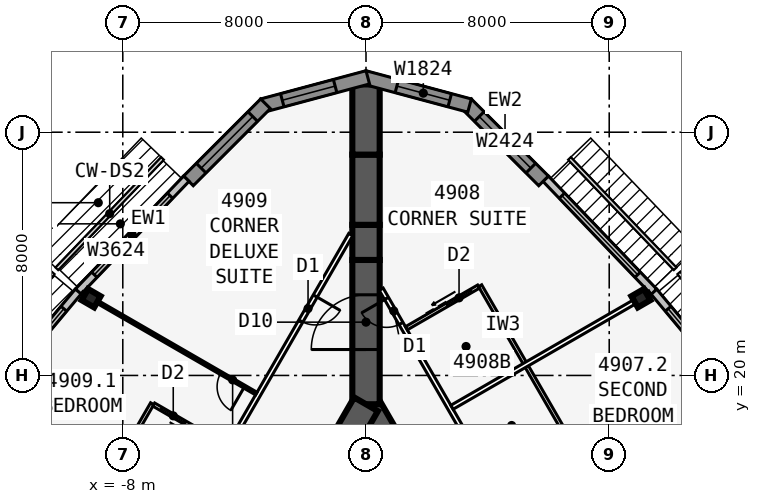
"""IFC4 building model, lengths in metres.
Left out: names, types, materials, properties, quantities, classifications, styles, units other than length and angle.
Written with IfcOpenShell. Run it as: python <this file> out.ifc"""

import sys

from ifc_helpers import new_model, si_unit, direction, frame, frame_2d, origin, origin_2d, place, context, subcontext, project, spatial, polyline, rectangle, i_section, outline, extrude, element, fill, save


model = new_model("IFC4")
c1 = context("Model", 3, precision=1e-05, world=origin(), true_north=direction((0.0, 1.0)))
c2 = subcontext(c1, "Body", "Model", "MODEL_VIEW")
j1 = project(units=[si_unit("LENGTHUNIT", "METRE"), si_unit("PLANEANGLEUNIT", "RADIAN")], contexts=[c1])
p1 = place(None, origin())
s1 = spatial("IfcSite", under=j1, at=p1, CompositionType="ELEMENT")
p2 = place(p1, origin())
s2 = spatial("IfcBuilding", under=s1, at=p2, CompositionType="ELEMENT")
p3 = place(p2, frame((0.0, 0.0, 182.7)))
s3 = spatial("IfcBuildingStorey", under=s2, at=p3, CompositionType="ELEMENT", Elevation=182.7)
p4 = place(p3, frame((16.5, -9.526, 0.0), z_axis=(0.0, 0.0, 1.0), x_axis=(-0.499999749417, 0.866025548458, 0.0)))
e1 = element("IfcWall", 1, at=p4, inside=s3, PredefinedType="SHEAR", context=c2, shape_type="SweptSolid", body=[
    extrude(rectangle(XDim=33.0, YDim=0.9, at=frame_2d((16.5, 0.0))), origin(), (0.0, 0.0, 1.0), 3.4),
])
p5 = place(p4, frame((14.15, 0.0, 0.0)))
e2 = element("IfcOpeningElement", 2, at=p5, cuts=e1, PredefinedType="OPENING", context=c2, shape_type="SweptSolid", body=[
    extrude(rectangle(XDim=1.8, YDim=2.13, at=frame_2d((0.9, 1.065))), frame((0.0, 0.46, 0.0), z_axis=(0.0, -1.0, 0.0), x_axis=(1.0, 0.0, 0.0)), (0.0, 0.0, 1.0), 0.92),
])
p6 = place(p4, frame((12.6, 0.0, 0.0)))
e3 = element("IfcOpeningElement", 3, at=p6, cuts=e1, PredefinedType="OPENING", context=c2, shape_type="SweptSolid", body=[
    extrude(rectangle(XDim=1.0, YDim=2.13, at=frame_2d((0.5, 1.065))), frame((0.0, 0.46, 0.0), z_axis=(0.0, -1.0, 0.0), x_axis=(1.0, 0.0, 0.0)), (0.0, 0.0, 1.0), 0.92),
])
p7 = place(p3, frame((0.0, 19.052, 0.0), z_axis=(0.0, 0.0, 1.0), x_axis=(-0.499999749417, -0.866025548458, 0.0)))
e4 = element("IfcWall", 4, at=p7, inside=s3, PredefinedType="SHEAR", context=c2, shape_type="SweptSolid", body=[
    extrude(rectangle(XDim=33.0, YDim=0.9, at=frame_2d((16.5, 0.0))), origin(), (0.0, 0.0, 1.0), 3.4),
])
p8 = place(p7, frame((14.15, 0.0, 0.0)))
e5 = element("IfcOpeningElement", 5, at=p8, cuts=e4, PredefinedType="OPENING", context=c2, shape_type="SweptSolid", body=[
    extrude(rectangle(XDim=1.8, YDim=2.13, at=frame_2d((0.9, 1.065))), frame((0.0, 0.46, 0.0), z_axis=(0.0, -1.0, 0.0), x_axis=(1.0, 0.0, 0.0)), (0.0, 0.0, 1.0), 0.92),
])
p9 = place(p7, frame((12.6, 0.0, 0.0)))
e6 = element("IfcOpeningElement", 6, at=p9, cuts=e4, PredefinedType="OPENING", context=c2, shape_type="SweptSolid", body=[
    extrude(rectangle(XDim=1.0, YDim=2.13, at=frame_2d((0.5, 1.065))), frame((0.0, 0.46, 0.0), z_axis=(0.0, -1.0, 0.0), x_axis=(1.0, 0.0, 0.0)), (0.0, 0.0, 1.0), 0.92),
])
p10 = place(p3, frame((0.0, 19.052, 0.0), z_axis=(0.0, 0.0, 1.0), x_axis=(0.0, 1.0, 0.0)))
e7 = element("IfcWall", 7, at=p10, inside=s3, PredefinedType="SHEAR", context=c2, shape_type="SweptSolid", body=[
    extrude(rectangle(XDim=4.746, YDim=0.9, at=frame_2d((2.373, 0.0))), origin(), (0.0, 0.0, 1.0), 3.4),
])
p11 = place(p10, frame((1.8, 0.0, 0.0)))
e8 = element("IfcOpeningElement", 8, at=p11, cuts=e7, PredefinedType="OPENING", context=c2, shape_type="SweptSolid", body=[
    extrude(rectangle(XDim=1.8, YDim=2.13, at=frame_2d((0.9, 1.065))), frame((0.0, 0.46, 0.0), z_axis=(0.0, -1.0, 0.0), x_axis=(1.0, 0.0, 0.0)), (0.0, 0.0, 1.0), 0.92),
])
p12 = place(p3, frame((0.0, 23.799, 0.0), z_axis=(0.0, 0.0, 1.0), x_axis=(0.0, 1.0, 0.0)))
e9 = element("IfcWall", 9, at=p12, inside=s3, PredefinedType="SHEAR", context=c2, shape_type="SweptSolid", body=[
    extrude(rectangle(XDim=1.155, YDim=0.9, at=frame_2d((0.577, 0.0))), origin(), (0.0, 0.0, 1.0), 3.4),
])
p13 = place(p3, frame((0.0, 24.953, 0.0), z_axis=(0.0, 0.0, 1.0), x_axis=(0.0, 1.0, 0.0)))
e10 = element("IfcWall", 10, at=p13, inside=s3, PredefinedType="SHEAR", context=c2, shape_type="SweptSolid", body=[
    extrude(rectangle(XDim=2.309, YDim=0.9, at=frame_2d((1.155, 0.0))), origin(), (0.0, 0.0, 1.0), 3.4),
])
p14 = place(p3, frame((0.0, 27.263, 0.0), z_axis=(0.0, 0.0, 1.0), x_axis=(0.0, 1.0, 0.0)))
e11 = element("IfcWall", 11, at=p14, inside=s3, PredefinedType="SHEAR", context=c2, shape_type="SweptSolid", body=[
    extrude(rectangle(XDim=2.31, YDim=0.9, at=frame_2d((1.155, 0.0))), origin(), (0.0, 0.0, 1.0), 3.4),
])
for number, where, z_axis, x_axis in (
    (12, (9.041, 22.541, 0.0), (0.0, 0.0, 1.0), (-0.5, 0.866, 0.0)),
    (13, (-9.041, 22.541, 0.0), (0.0, 0.0, 1.0), (-0.5, -0.866, 0.0)),
):
    element("IfcColumn", number, at=place(p3, frame(where, z_axis=z_axis, x_axis=x_axis)), inside=s3, PredefinedType="COLUMN", context=c2, shape_type="SweptSolid", body=[
        extrude(i_section(OverallWidth=0.424, OverallDepth=0.475, WebThickness=0.048, FlangeThickness=0.077, at=origin_2d()), origin(), (0.0, 0.0, 1.0), 3.4),
    ])
p15 = place(p3, frame((12.723, 18.868, 0.0), z_axis=(0.0, 0.0, 1.0), x_axis=(-0.641810386606, 0.766863369607, 0.0)))
e14 = element("IfcWall", 14, at=p15, inside=s3, PredefinedType="STANDARD", context=c2, shape_type="SweptSolid", body=[
    extrude(rectangle(XDim=5.076, YDim=0.25, at=frame_2d((2.538, 0.0))), origin(), (0.0, 0.0, 1.0), 3.235),
])
p16 = place(p15, frame((0.738, 0.0, 0.45)))
e15 = element("IfcOpeningElement", 15, at=p16, cuts=e14, PredefinedType="OPENING", context=c2, shape_type="SweptSolid", body=[
    extrude(rectangle(XDim=3.6, YDim=2.4, at=frame_2d((1.8, 1.2))), frame((0.0, 0.135, 0.0), z_axis=(0.0, -1.0, 0.0), x_axis=(1.0, 0.0, 0.0)), (0.0, 0.0, 1.0), 0.27),
])
p17 = place(p3, frame((9.471, 22.754, 0.0), z_axis=(0.0, 0.0, 1.0), x_axis=(-0.691719937936, 0.722165858693, 0.0)))
e16 = element("IfcWall", 16, at=p17, inside=s3, PredefinedType="STANDARD", context=c2, shape_type="SweptSolid", body=[
    extrude(rectangle(XDim=5.148, YDim=0.25, at=frame_2d((2.574, 0.0))), origin(), (0.0, 0.0, 1.0), 3.235),
])
p18 = place(p17, frame((0.774, 0.0, 0.45)))
e17 = element("IfcOpeningElement", 17, at=p18, cuts=e16, PredefinedType="OPENING", context=c2, shape_type="SweptSolid", body=[
    extrude(rectangle(XDim=3.6, YDim=2.4, at=frame_2d((1.8, 1.2))), frame((0.0, 0.135, 0.0), z_axis=(0.0, -1.0, 0.0), x_axis=(1.0, 0.0, 0.0)), (0.0, 0.0, 1.0), 0.27),
])
p19 = place(p3, frame((5.841, 26.399, 0.0), z_axis=(0.0, 0.0, 1.0), x_axis=(-0.707106781187, 0.707106781187, 0.0)))
e18 = element("IfcWall", 18, at=p19, inside=s3, PredefinedType="SOLIDWALL", context=c2, shape_type="SweptSolid", body=[
    extrude(rectangle(XDim=3.586, YDim=0.45, at=frame_2d((1.793, 0.0))), origin(), (0.0, 0.0, 1.0), 3.235),
])
p20 = place(p19, frame((0.593, 0.0, 0.45)))
e19 = element("IfcOpeningElement", 19, at=p20, cuts=e18, PredefinedType="OPENING", context=c2, shape_type="SweptSolid", body=[
    extrude(rectangle(XDim=2.4, YDim=2.4, at=frame_2d((1.2, 1.2))), frame((0.0, 0.235, 0.0), z_axis=(0.0, -1.0, 0.0), x_axis=(1.0, 0.0, 0.0)), (0.0, 0.0, 1.0), 0.47),
])
p21 = place(p3, frame((3.406, 28.877, 0.0), z_axis=(0.0, 0.0, 1.0), x_axis=(-0.965924653531, 0.258823421857, 0.0)))
e20 = element("IfcWall", 20, at=p21, inside=s3, PredefinedType="SOLIDWALL", context=c2, shape_type="SweptSolid", body=[
    extrude(outline(polyline([(3.586, 0.225), (3.527, 0.225), (3.035, 0.093), (3.0, 0.225), (0.0, 0.225), (0.0, -0.225), (3.586, -0.225), (3.586, 0.225)])), origin(), (0.0, 0.0, 1.0), 3.235),
])
p22 = place(p21, frame((0.675, 0.0, 0.45)))
e21 = element("IfcOpeningElement", 21, at=p22, cuts=e20, PredefinedType="OPENING", context=c2, shape_type="SweptSolid", body=[
    extrude(rectangle(XDim=1.8, YDim=2.4, at=frame_2d((0.9, 1.2))), frame((0.0, 0.235, 0.0), z_axis=(0.0, -1.0, 0.0), x_axis=(1.0, 0.0, 0.0)), (0.0, 0.0, 1.0), 0.47),
])
p23 = place(p3, frame((0.058, 29.805, 0.0), z_axis=(0.0, 0.0, 1.0), x_axis=(-0.965924653531, -0.258823421857, 0.0)))
e22 = element("IfcWall", 22, at=p23, inside=s3, PredefinedType="SOLIDWALL", context=c2, shape_type="SweptSolid", body=[
    extrude(outline(polyline([(3.586, 0.225), (0.586, 0.225), (0.551, 0.093), (0.06, 0.225), (0.0, 0.225), (0.0, -0.225), (3.586, -0.225), (3.586, 0.225)])), origin(), (0.0, 0.0, 1.0), 3.235),
])
p24 = place(p23, frame((1.111, 0.0, 0.45)))
e23 = element("IfcOpeningElement", 23, at=p24, cuts=e22, PredefinedType="OPENING", context=c2, shape_type="SweptSolid", body=[
    extrude(rectangle(XDim=1.8, YDim=2.4, at=frame_2d((0.9, 1.2))), frame((0.0, 0.235, 0.0), z_axis=(0.0, -1.0, 0.0), x_axis=(1.0, 0.0, 0.0)), (0.0, 0.0, 1.0), 0.47),
])
p25 = place(p3, frame((-3.305, 28.935, 0.0), z_axis=(0.0, 0.0, 1.0), x_axis=(-0.707106781187, -0.707106781187, 0.0)))
e24 = element("IfcWall", 24, at=p25, inside=s3, PredefinedType="SOLIDWALL", context=c2, shape_type="SweptSolid", body=[
    extrude(rectangle(XDim=3.586, YDim=0.45, at=frame_2d((1.793, 0.0))), origin(), (0.0, 0.0, 1.0), 3.235),
])
p26 = place(p25, frame((0.593, 0.0, 0.45)))
e25 = element("IfcOpeningElement", 25, at=p26, cuts=e24, PredefinedType="OPENING", context=c2, shape_type="SweptSolid", body=[
    extrude(rectangle(XDim=2.4, YDim=2.4, at=frame_2d((1.2, 1.2))), frame((0.0, 0.235, 0.0), z_axis=(0.0, -1.0, 0.0), x_axis=(1.0, 0.0, 0.0)), (0.0, 0.0, 1.0), 0.47),
])
p27 = place(p3, frame((-5.91, 26.472, 0.0), z_axis=(0.0, 0.0, 1.0), x_axis=(-0.691719937936, -0.722165858693, 0.0)))
e26 = element("IfcWall", 26, at=p27, inside=s3, PredefinedType="STANDARD", context=c2, shape_type="SweptSolid", body=[
    extrude(rectangle(XDim=5.148, YDim=0.25, at=frame_2d((2.574, 0.0))), origin(), (0.0, 0.0, 1.0), 3.235),
])
p28 = place(p27, frame((0.774, 0.0, 0.45)))
e27 = element("IfcOpeningElement", 27, at=p28, cuts=e26, PredefinedType="OPENING", context=c2, shape_type="SweptSolid", body=[
    extrude(rectangle(XDim=3.6, YDim=2.4, at=frame_2d((1.8, 1.2))), frame((0.0, 0.135, 0.0), z_axis=(0.0, -1.0, 0.0), x_axis=(1.0, 0.0, 0.0)), (0.0, 0.0, 1.0), 0.27),
])
p29 = place(p3, frame((-9.465, 22.76, 0.0), z_axis=(0.0, 0.0, 1.0), x_axis=(-0.641810386606, -0.766863369607, 0.0)))
e28 = element("IfcWall", 28, at=p29, inside=s3, PredefinedType="STANDARD", context=c2, shape_type="SweptSolid", body=[
    extrude(rectangle(XDim=5.076, YDim=0.25, at=frame_2d((2.538, 0.0))), origin(), (0.0, 0.0, 1.0), 3.235),
])
p30 = place(p29, frame((0.738, 0.0, 0.45)))
e29 = element("IfcOpeningElement", 29, at=p30, cuts=e28, PredefinedType="OPENING", context=c2, shape_type="SweptSolid", body=[
    extrude(rectangle(XDim=3.6, YDim=2.4, at=frame_2d((1.8, 1.2))), frame((0.0, 0.135, 0.0), z_axis=(0.0, -1.0, 0.0), x_axis=(1.0, 0.0, 0.0)), (0.0, 0.0, 1.0), 0.27),
])
p31 = place(p3, frame((20.027, -10.985, 0.0), z_axis=(0.0, 0.0, 1.0), x_axis=(-0.500001677587, 0.866024435227, 0.0)))
e30 = element("IfcWall", 30, at=p31, inside=s3, PredefinedType="PARTITIONING", context=c2, shape_type="SweptSolid", body=[
    extrude(rectangle(XDim=39.054, YDim=0.15, at=frame_2d((19.527, 0.0))), origin(), (0.0, 0.0, 1.0), 3.235),
])
p32 = place(p31, frame((1.558, 0.0, 0.0)))
e31 = element("IfcOpeningElement", 31, at=p32, cuts=e30, PredefinedType="OPENING", context=c2, shape_type="SweptSolid", body=[
    extrude(rectangle(XDim=0.95, YDim=2.13, at=frame_2d((0.475, 1.065))), frame((0.0, 0.085, 0.0), z_axis=(0.0, -1.0, 0.0), x_axis=(1.0, 0.0, 0.0)), (0.0, 0.0, 1.0), 0.17),
])
p33 = place(p31, frame((12.752, 0.0, 0.0)))
e32 = element("IfcOpeningElement", 32, at=p33, cuts=e30, PredefinedType="OPENING", context=c2, shape_type="SweptSolid", body=[
    extrude(rectangle(XDim=0.95, YDim=2.13, at=frame_2d((0.475, 1.065))), frame((0.0, 0.085, 0.0), z_axis=(0.0, -1.0, 0.0), x_axis=(1.0, 0.0, 0.0)), (0.0, 0.0, 1.0), 0.17),
])
p34 = place(p31, frame((26.552, 0.0, 0.0)))
e33 = element("IfcOpeningElement", 33, at=p34, cuts=e30, PredefinedType="OPENING", context=c2, shape_type="SweptSolid", body=[
    extrude(rectangle(XDim=0.95, YDim=2.13, at=frame_2d((0.475, 1.065))), frame((0.0, 0.085, 0.0), z_axis=(0.0, -1.0, 0.0), x_axis=(1.0, 0.0, 0.0)), (0.0, 0.0, 1.0), 0.17),
])
p35 = place(p31, frame((37.752, 0.0, 0.0)))
e34 = element("IfcOpeningElement", 34, at=p35, cuts=e30, PredefinedType="OPENING", context=c2, shape_type="SweptSolid", body=[
    extrude(rectangle(XDim=0.95, YDim=2.13, at=frame_2d((0.475, 1.065))), frame((0.0, 0.085, 0.0), z_axis=(0.0, -1.0, 0.0), x_axis=(1.0, 0.0, 0.0)), (0.0, 0.0, 1.0), 0.17),
])
p36 = place(p3, frame((5.329, 14.623, 0.0), z_axis=(0.0, 0.0, 1.0), x_axis=(0.866011723728, 0.500023693804, 0.0)))
e35 = element("IfcWall", 35, at=p36, inside=s3, PredefinedType="PARTITIONING", context=c2, shape_type="SweptSolid", body=[
    extrude(rectangle(XDim=8.395, YDim=0.1, at=frame_2d((4.198, 0.0))), origin(), (0.0, 0.0, 1.0), 2.389),
])
p37 = place(p36, frame((0.45, 0.0, 0.0)))
e36 = element("IfcOpeningElement", 36, at=p37, cuts=e35, PredefinedType="OPENING", context=c2, shape_type="SweptSolid", body=[
    extrude(rectangle(XDim=0.9, YDim=2.13, at=frame_2d((0.45, 1.065))), frame((0.0, 0.06, 0.0), z_axis=(0.0, -1.0, 0.0), x_axis=(1.0, 0.0, 0.0)), (0.0, 0.0, 1.0), 0.12),
])
p38 = place(p3, frame((2.829, 18.954, 0.0), z_axis=(0.0, 0.0, 1.0), x_axis=(0.866015739374, 0.500016738876, 0.0)))
e37 = element("IfcWall", 37, at=p38, inside=s3, PredefinedType="PARTITIONING", context=c2, shape_type="SweptSolid", body=[
    extrude(rectangle(XDim=7.516, YDim=0.15, at=frame_2d((3.758, 0.0))), origin(), (0.0, 0.0, 1.0), 2.389),
])
for number, where, z_axis, x_axis in (
    (38, (6.753, 17.755, 0.0), (0.0, 0.0, 1.0), (-0.5, 0.866, 0.0)),
    (39, (5.253, 20.354, 0.0), (0.0, 0.0, 1.0), (-0.5, 0.866, 0.0)),
):
    element("IfcWall", number, at=place(p3, frame(where, z_axis=z_axis, x_axis=x_axis)), inside=s3, PredefinedType="PLUMBINGWALL", context=c2, shape_type="SweptSolid", body=[
        extrude(rectangle(XDim=3.0, YDim=0.12, at=frame_2d((1.5, 0.0))), origin(), (0.0, 0.0, 1.0), 3.235),
    ])
p39 = place(p3, frame((1.329, 21.552, 0.0), z_axis=(0.0, 0.0, 1.0), x_axis=(0.865997131366, 0.500048966069, 0.0)))
e40 = element("IfcWall", 40, at=p39, inside=s3, PredefinedType="PLUMBINGWALL", context=c2, shape_type="SweptSolid", body=[
    extrude(rectangle(XDim=2.74, YDim=0.12, at=frame_2d((1.37, 0.0))), origin(), (0.0, 0.0, 1.0), 3.235),
])
p40 = place(p39, frame((1.55, 0.0, 0.0)))
e41 = element("IfcOpeningElement", 41, at=p40, cuts=e40, PredefinedType="OPENING", context=c2, shape_type="SweptSolid", body=[
    extrude(rectangle(XDim=0.9, YDim=2.13, at=frame_2d((0.45, 1.065))), frame((0.0, 0.07, 0.0), z_axis=(0.0, -1.0, 0.0), x_axis=(1.0, 0.0, 0.0)), (0.0, 0.0, 1.0), 0.14),
])
p41 = place(p3, frame((-0.5, 24.636, 0.0), z_axis=(0.0, 0.0, 1.0), x_axis=(-0.500001915564, -0.86602429783, 0.0)))
e42 = element("IfcWall", 42, at=p41, inside=s3, PredefinedType="PARTITIONING", context=c2, shape_type="SweptSolid", body=[
    extrude(rectangle(XDim=42.172, YDim=0.15, at=frame_2d((21.086, 0.0))), origin(), (0.0, 0.0, 1.0), 3.235),
])
p42 = place(p41, frame((2.338, 0.0, 0.0)))
e43 = element("IfcOpeningElement", 43, at=p42, cuts=e42, PredefinedType="OPENING", context=c2, shape_type="SweptSolid", body=[
    extrude(rectangle(XDim=0.95, YDim=2.13, at=frame_2d((0.475, 1.065))), frame((0.0, 0.085, 0.0), z_axis=(0.0, -1.0, 0.0), x_axis=(1.0, 0.0, 0.0)), (0.0, 0.0, 1.0), 0.17),
])
p43 = place(p41, frame((18.111, 0.0, 0.0)))
e44 = element("IfcOpeningElement", 44, at=p43, cuts=e42, PredefinedType="OPENING", context=c2, shape_type="SweptSolid", body=[
    extrude(rectangle(XDim=0.95, YDim=2.13, at=frame_2d((0.475, 1.065))), frame((0.0, 0.085, 0.0), z_axis=(0.0, -1.0, 0.0), x_axis=(1.0, 0.0, 0.0)), (0.0, 0.0, 1.0), 0.17),
])
p44 = place(p41, frame((28.111, 0.0, 0.0)))
e45 = element("IfcOpeningElement", 45, at=p44, cuts=e42, PredefinedType="OPENING", context=c2, shape_type="SweptSolid", body=[
    extrude(rectangle(XDim=0.95, YDim=2.13, at=frame_2d((0.475, 1.065))), frame((0.0, 0.085, 0.0), z_axis=(0.0, -1.0, 0.0), x_axis=(1.0, 0.0, 0.0)), (0.0, 0.0, 1.0), 0.17),
])
p45 = place(p41, frame((39.311, 0.0, 0.0)))
e46 = element("IfcOpeningElement", 46, at=p45, cuts=e42, PredefinedType="OPENING", context=c2, shape_type="SweptSolid", body=[
    extrude(rectangle(XDim=0.95, YDim=2.13, at=frame_2d((0.475, 1.065))), frame((0.0, 0.085, 0.0), z_axis=(0.0, -1.0, 0.0), x_axis=(1.0, 0.0, 0.0)), (0.0, 0.0, 1.0), 0.17),
])
p46 = place(p3, frame((-3.608, 19.404, 0.0), z_axis=(0.0, 0.0, 1.0), x_axis=(-0.866015989873, 0.500016305018, 0.0)))
e47 = element("IfcWall", 47, at=p46, inside=s3, PredefinedType="PARTITIONING", context=c2, shape_type="SweptSolid", body=[
    extrude(rectangle(XDim=6.616, YDim=0.1, at=frame_2d((3.308, 0.0))), origin(), (0.0, 0.0, 1.0), 2.389),
])
p47 = place(p46, frame((0.45, 0.0, 0.0)))
e48 = element("IfcOpeningElement", 48, at=p47, cuts=e47, PredefinedType="OPENING", context=c2, shape_type="SweptSolid", body=[
    extrude(rectangle(XDim=0.9, YDim=2.13, at=frame_2d((0.45, 1.065))), frame((0.0, 0.06, 0.0), z_axis=(0.0, -1.0, 0.0), x_axis=(1.0, 0.0, 0.0)), (0.0, 0.0, 1.0), 0.12),
])
p48 = place(p3, frame((-6.108, 15.073, 0.0), z_axis=(0.0, 0.0, 1.0), x_axis=(-0.866025567496, 0.499999716443, 0.0)))
e49 = element("IfcWall", 49, at=p48, inside=s3, PredefinedType="PARTITIONING", context=c2, shape_type="SweptSolid", body=[
    extrude(rectangle(XDim=7.495, YDim=0.15, at=frame_2d((3.748, 0.0))), origin(), (0.0, 0.0, 1.0), 2.389),
])
p49 = place(p3, frame((-7.033, 19.072, 0.0), z_axis=(0.0, 0.0, 1.0), x_axis=(-0.499990139034, -0.866031096941, 0.0)))
e50 = element("IfcWall", 50, at=p49, inside=s3, PredefinedType="PLUMBINGWALL", context=c2, shape_type="SweptSolid", body=[
    extrude(rectangle(XDim=3.0, YDim=0.12, at=frame_2d((1.5, 0.0))), origin(), (0.0, 0.0, 1.0), 3.235),
])
p50 = place(p3, frame((-4.608, 17.671, 0.0), z_axis=(0.0, 0.0, 1.0), x_axis=(-0.865997131366, 0.500048966069, 0.0)))
e51 = element("IfcWall", 51, at=p50, inside=s3, PredefinedType="PLUMBINGWALL", context=c2, shape_type="SweptSolid", body=[
    extrude(rectangle(XDim=2.74, YDim=0.12, at=frame_2d((1.37, 0.0))), origin(), (0.0, 0.0, 1.0), 3.235),
])
p51 = place(p50, frame((1.55, 0.0, 0.0)))
e52 = element("IfcOpeningElement", 52, at=p51, cuts=e51, PredefinedType="OPENING", context=c2, shape_type="SweptSolid", body=[
    extrude(rectangle(XDim=0.9, YDim=2.13, at=frame_2d((0.45, 1.065))), frame((0.0, 0.07, 0.0), z_axis=(0.0, -1.0, 0.0), x_axis=(1.0, 0.0, 0.0)), (0.0, 0.0, 1.0), 0.14),
])
p52 = place(p16, origin())
e53 = element("IfcWindow", 53, at=p52, inside=s3, PartitioningType="SINGLE_PANEL", PredefinedType="WINDOW", context=c2, shape_type="SweptSolid", body=[
    extrude(rectangle(XDim=3.6, YDim=2.4, at=frame_2d((1.8, 1.2))), frame((0.0, 0.03, 0.0), z_axis=(0.0, -1.0, 0.0), x_axis=(1.0, 0.0, 0.0)), (0.0, 0.0, 1.0), 0.06),
])
fill(e15, e53)
p53 = place(p18, origin())
e54 = element("IfcWindow", 54, at=p53, inside=s3, PartitioningType="SINGLE_PANEL", PredefinedType="WINDOW", context=c2, shape_type="SweptSolid", body=[
    extrude(rectangle(XDim=3.6, YDim=2.4, at=frame_2d((1.8, 1.2))), frame((0.0, 0.03, 0.0), z_axis=(0.0, -1.0, 0.0), x_axis=(1.0, 0.0, 0.0)), (0.0, 0.0, 1.0), 0.06),
])
fill(e17, e54)
p54 = place(p20, origin())
e55 = element("IfcWindow", 55, at=p54, inside=s3, PartitioningType="SINGLE_PANEL", PredefinedType="WINDOW", context=c2, shape_type="SweptSolid", body=[
    extrude(rectangle(XDim=2.4, YDim=2.4, at=frame_2d((1.2, 1.2))), frame((0.0, 0.03, 0.0), z_axis=(0.0, -1.0, 0.0), x_axis=(1.0, 0.0, 0.0)), (0.0, 0.0, 1.0), 0.06),
])
fill(e19, e55)
p55 = place(p22, origin())
e56 = element("IfcWindow", 56, at=p55, inside=s3, PartitioningType="SINGLE_PANEL", PredefinedType="WINDOW", context=c2, shape_type="SweptSolid", body=[
    extrude(rectangle(XDim=1.8, YDim=2.4, at=frame_2d((0.9, 1.2))), frame((0.0, 0.03, 0.0), z_axis=(0.0, -1.0, 0.0), x_axis=(1.0, 0.0, 0.0)), (0.0, 0.0, 1.0), 0.06),
])
fill(e21, e56)
p56 = place(p24, origin())
e57 = element("IfcWindow", 57, at=p56, inside=s3, PartitioningType="SINGLE_PANEL", PredefinedType="WINDOW", context=c2, shape_type="SweptSolid", body=[
    extrude(rectangle(XDim=1.8, YDim=2.4, at=frame_2d((0.9, 1.2))), frame((0.0, 0.03, 0.0), z_axis=(0.0, -1.0, 0.0), x_axis=(1.0, 0.0, 0.0)), (0.0, 0.0, 1.0), 0.06),
])
fill(e23, e57)
p57 = place(p26, origin())
e58 = element("IfcWindow", 58, at=p57, inside=s3, PartitioningType="SINGLE_PANEL", PredefinedType="WINDOW", context=c2, shape_type="SweptSolid", body=[
    extrude(rectangle(XDim=2.4, YDim=2.4, at=frame_2d((1.2, 1.2))), frame((0.0, 0.03, 0.0), z_axis=(0.0, -1.0, 0.0), x_axis=(1.0, 0.0, 0.0)), (0.0, 0.0, 1.0), 0.06),
])
fill(e25, e58)
p58 = place(p28, origin())
e59 = element("IfcWindow", 59, at=p58, inside=s3, PartitioningType="SINGLE_PANEL", PredefinedType="WINDOW", context=c2, shape_type="SweptSolid", body=[
    extrude(rectangle(XDim=3.6, YDim=2.4, at=frame_2d((1.8, 1.2))), frame((0.0, 0.03, 0.0), z_axis=(0.0, -1.0, 0.0), x_axis=(1.0, 0.0, 0.0)), (0.0, 0.0, 1.0), 0.06),
])
fill(e27, e59)
p59 = place(p30, origin())
e60 = element("IfcWindow", 60, at=p59, inside=s3, PartitioningType="SINGLE_PANEL", PredefinedType="WINDOW", context=c2, shape_type="SweptSolid", body=[
    extrude(rectangle(XDim=3.6, YDim=2.4, at=frame_2d((1.8, 1.2))), frame((0.0, 0.03, 0.0), z_axis=(0.0, -1.0, 0.0), x_axis=(1.0, 0.0, 0.0)), (0.0, 0.0, 1.0), 0.06),
])
fill(e29, e60)
p60 = place(p40, origin())
e61 = element("IfcDoor", 61, at=p60, inside=s3, OperationType="SLIDING_TO_LEFT", PredefinedType="DOOR", context=c2, shape_type="SweptSolid", body=[
    extrude(rectangle(XDim=0.9, YDim=2.13, at=frame_2d((0.45, 1.065))), frame((0.0, 0.025, 0.0), z_axis=(0.0, -1.0, 0.0), x_axis=(1.0, 0.0, 0.0)), (0.0, 0.0, 1.0), 0.05),
])
fill(e41, e61)
p61 = place(p35, origin())
e62 = element("IfcDoor", 62, at=p61, inside=s3, OperationType="SINGLE_SWING_RIGHT", PredefinedType="DOOR", context=c2, shape_type="SweptSolid", body=[
    extrude(rectangle(XDim=0.95, YDim=2.13, at=frame_2d((0.475, 1.065))), frame((0.0, 0.025, 0.0), z_axis=(0.0, -1.0, 0.0), x_axis=(1.0, 0.0, 0.0)), (0.0, 0.0, 1.0), 0.05),
])
fill(e34, e62)
p62 = place(p47, origin())
e63 = element("IfcDoor", 63, at=p62, inside=s3, OperationType="SINGLE_SWING_LEFT", PredefinedType="DOOR", context=c2, shape_type="SweptSolid", body=[
    extrude(rectangle(XDim=0.9, YDim=2.13, at=frame_2d((0.45, 1.065))), frame((0.0, 0.025, 0.0), z_axis=(0.0, -1.0, 0.0), x_axis=(1.0, 0.0, 0.0)), (0.0, 0.0, 1.0), 0.05),
])
fill(e48, e63)
p63 = place(p42, origin())
e64 = element("IfcDoor", 64, at=p63, inside=s3, OperationType="SINGLE_SWING_LEFT", PredefinedType="DOOR", context=c2, shape_type="SweptSolid", body=[
    extrude(rectangle(XDim=0.95, YDim=2.13, at=frame_2d((0.475, 1.065))), frame((0.0, 0.025, 0.0), z_axis=(0.0, -1.0, 0.0), x_axis=(1.0, 0.0, 0.0)), (0.0, 0.0, 1.0), 0.05),
])
fill(e43, e64)
p64 = place(p51, origin())
e65 = element("IfcDoor", 65, at=p64, inside=s3, OperationType="SLIDING_TO_LEFT", PredefinedType="DOOR", context=c2, shape_type="SweptSolid", body=[
    extrude(rectangle(XDim=0.9, YDim=2.13, at=frame_2d((0.45, 1.065))), frame((0.0, 0.025, 0.0), z_axis=(0.0, -1.0, 0.0), x_axis=(1.0, 0.0, 0.0)), (0.0, 0.0, 1.0), 0.05),
])
fill(e52, e65)
p65 = place(p11, origin())
e66 = element("IfcDoor", 66, at=p65, inside=s3, OperationType="DOUBLE_DOOR_DOUBLE_SWING", PredefinedType="DOOR", context=c2, shape_type="SweptSolid", body=[
    extrude(rectangle(XDim=1.8, YDim=2.13, at=frame_2d((0.9, 1.065))), frame((0.0, 0.025, 0.0), z_axis=(0.0, -1.0, 0.0), x_axis=(1.0, 0.0, 0.0)), (0.0, 0.0, 1.0), 0.05),
])
fill(e8, e66)
save(model, sys.argv[1])
